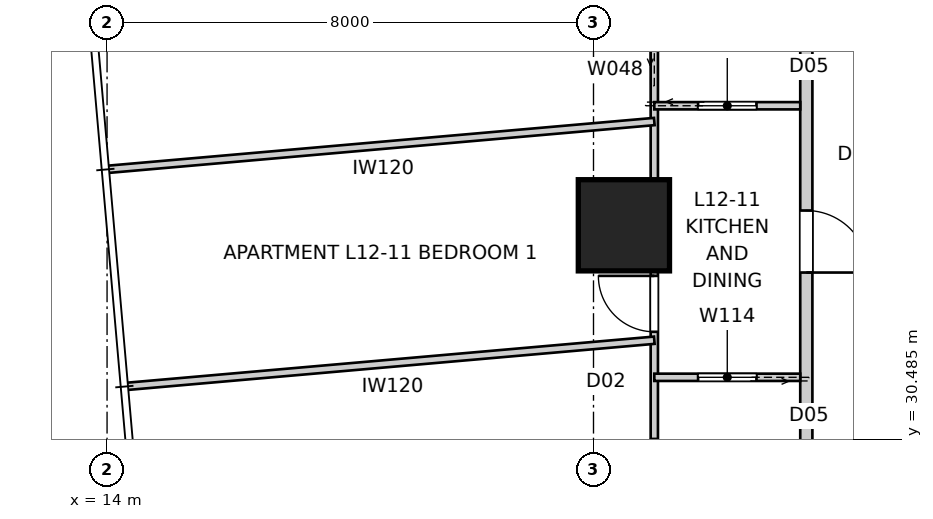
"""IFC4 building model, lengths in metres.
Left out: names, types, materials, properties, quantities, classifications, styles, units other than length and angle.
Written with IfcOpenShell. Run it as: python <this file> out.ifc"""

import sys

from ifc_helpers import new_model, si_unit, direction, frame, frame_2d, origin, origin_2d, place, context, subcontext, project, spatial, rectangle, extrude, element, fill, save


model = new_model("IFC4")
c1 = context("Model", 3, precision=1e-05, world=origin(), true_north=direction((0.0, 1.0)))
c2 = subcontext(c1, "Body", "Model", "MODEL_VIEW")
j1 = project(units=[si_unit("LENGTHUNIT", "METRE"), si_unit("PLANEANGLEUNIT", "RADIAN")], contexts=[c1])
p1 = place(None, origin())
s1 = spatial("IfcSite", under=j1, at=p1, CompositionType="ELEMENT")
p2 = place(p1, origin())
s2 = spatial("IfcBuilding", under=s1, at=p2, CompositionType="ELEMENT")
p3 = place(p2, frame((0.0, 0.0, 47.2)))
s3 = spatial("IfcBuildingStorey", under=s2, at=p3, CompositionType="ELEMENT", Elevation=47.2)
p4 = place(p3, frame((22.5, 34.0, 0.0), z_axis=(0.0, 0.0, 1.0), x_axis=(1.0, 0.0, 0.0)))
e1 = element("IfcColumn", 1, at=p4, inside=s3, PredefinedType="COLUMN", context=c2, shape_type="SweptSolid", body=[
    extrude(rectangle(XDim=1.5, YDim=1.5, at=origin_2d()), origin(), (0.0, 0.0, 1.0), 3.4),
])
p5 = place(p3, frame((25.5, 43.7, 0.0), z_axis=(0.0, 0.0, 1.0), x_axis=(0.0, -1.0, 0.0)))
e2 = element("IfcWall", 2, at=p5, inside=s3, PredefinedType="PARTITIONING", context=c2, shape_type="SweptSolid", body=[
    extrude(rectangle(XDim=28.2, YDim=0.2, at=frame_2d((14.1, 0.0))), origin(), (0.0, 0.0, 1.0), 3.25),
])
p6 = place(p5, frame((21.113, 0.0, 0.0)))
e3 = element("IfcOpeningElement", 3, at=p6, cuts=e2, PredefinedType="OPENING", context=c2, shape_type="SweptSolid", body=[
    extrude(rectangle(XDim=1.02, YDim=2.34, at=frame_2d((0.51, 1.17))), frame((0.0, 0.11, 0.0), z_axis=(0.0, -1.0, 0.0), x_axis=(1.0, 0.0, 0.0)), (0.0, 0.0, 1.0), 0.22),
])
p7 = place(p5, frame((9.457, 0.0, 0.0)))
e4 = element("IfcOpeningElement", 4, at=p7, cuts=e2, PredefinedType="OPENING", context=c2, shape_type="SweptSolid", body=[
    extrude(rectangle(XDim=1.02, YDim=2.34, at=frame_2d((0.51, 1.17))), frame((0.0, 0.11, 0.0), z_axis=(0.0, -1.0, 0.0), x_axis=(1.0, 0.0, 0.0)), (0.0, 0.0, 1.0), 0.22),
])
p8 = place(p3, frame((23.0, 21.319, 0.0), z_axis=(0.0, 0.0, 1.0), x_axis=(0.0, 1.0, 0.0)))
e5 = element("IfcWall", 5, at=p8, inside=s3, PredefinedType="PARTITIONING", context=c2, shape_type="SweptSolid", body=[
    extrude(rectangle(XDim=25.681, YDim=0.12, at=frame_2d((12.841, 0.0))), origin(), (0.0, 0.0, 1.0), 2.55),
])
p9 = place(p8, frame((1.364, 0.0, 0.0)))
e6 = element("IfcOpeningElement", 6, at=p9, cuts=e5, PredefinedType="OPENING", context=c2, shape_type="SweptSolid", body=[
    extrude(rectangle(XDim=0.92, YDim=2.34, at=frame_2d((0.46, 1.17))), frame((0.0, 0.07, 0.0), z_axis=(0.0, -1.0, 0.0), x_axis=(1.0, 0.0, 0.0)), (0.0, 0.0, 1.0), 0.14),
])
p10 = place(p8, frame((10.93, 0.0, 0.0)))
e7 = element("IfcOpeningElement", 7, at=p10, cuts=e5, PredefinedType="OPENING", context=c2, shape_type="SweptSolid", body=[
    extrude(rectangle(XDim=0.92, YDim=2.34, at=frame_2d((0.46, 1.17))), frame((0.0, 0.07, 0.0), z_axis=(0.0, -1.0, 0.0), x_axis=(1.0, 0.0, 0.0)), (0.0, 0.0, 1.0), 0.14),
])
p11 = place(p8, frame((22.233, 0.0, 0.0)))
e8 = element("IfcOpeningElement", 8, at=p11, cuts=e5, PredefinedType="OPENING", context=c2, shape_type="SweptSolid", body=[
    extrude(rectangle(XDim=0.92, YDim=2.34, at=frame_2d((0.46, 1.17))), frame((0.0, 0.07, 0.0), z_axis=(0.0, -1.0, 0.0), x_axis=(1.0, 0.0, 0.0)), (0.0, 0.0, 1.0), 0.14),
])
p12 = place(p8, frame((18.991, 0.0, 0.0)))
e9 = element("IfcOpeningElement", 9, at=p12, cuts=e5, PredefinedType="OPENING", context=c2, shape_type="SweptSolid", body=[
    extrude(rectangle(XDim=0.96, YDim=2.1, at=frame_2d((0.48, 1.05))), frame((0.0, 0.07, 0.0), z_axis=(0.0, -1.0, 0.0), x_axis=(1.0, 0.0, 0.0)), (0.0, 0.0, 1.0), 0.14),
])
p13 = place(p8, frame((5.561, 0.0, 0.0)))
e10 = element("IfcOpeningElement", 10, at=p13, cuts=e5, PredefinedType="OPENING", context=c2, shape_type="SweptSolid", body=[
    extrude(rectangle(XDim=0.96, YDim=2.1, at=frame_2d((0.48, 1.05))), frame((0.0, 0.07, 0.0), z_axis=(0.0, -1.0, 0.0), x_axis=(1.0, 0.0, 0.0)), (0.0, 0.0, 1.0), 0.14),
])
p14 = place(p8, frame((15.836, 0.0, 0.0)))
e11 = element("IfcOpeningElement", 11, at=p14, cuts=e5, PredefinedType="OPENING", context=c2, shape_type="SweptSolid", body=[
    extrude(rectangle(XDim=0.96, YDim=2.1, at=frame_2d((0.48, 1.05))), frame((0.0, 0.07, 0.0), z_axis=(0.0, -1.0, 0.0), x_axis=(1.0, 0.0, 0.0)), (0.0, 0.0, 1.0), 0.14),
])
p15 = place(p8, frame((8.208, 0.0, 0.0)))
e12 = element("IfcOpeningElement", 12, at=p15, cuts=e5, PredefinedType="OPENING", context=c2, shape_type="SweptSolid", body=[
    extrude(rectangle(XDim=0.96, YDim=2.1, at=frame_2d((0.48, 1.05))), frame((0.0, 0.07, 0.0), z_axis=(0.0, -1.0, 0.0), x_axis=(1.0, 0.0, 0.0)), (0.0, 0.0, 1.0), 0.14),
])
p16 = place(p3, frame((23.0, 35.966, 0.0), z_axis=(0.0, 0.0, 1.0), x_axis=(1.0, 0.0, 0.0)))
e13 = element("IfcWall", 13, at=p16, inside=s3, PredefinedType="PARTITIONING", context=c2, shape_type="SweptSolid", body=[
    extrude(rectangle(XDim=2.4, YDim=0.12, at=frame_2d((1.2, 0.0))), origin(), (0.0, 0.0, 1.0), 3.25),
])
p17 = place(p16, frame((0.72, 0.0, 0.0)))
e14 = element("IfcOpeningElement", 14, at=p17, cuts=e13, PredefinedType="OPENING", context=c2, shape_type="SweptSolid", body=[
    extrude(rectangle(XDim=0.96, YDim=2.1, at=frame_2d((0.48, 1.05))), frame((0.0, 0.07, 0.0), z_axis=(0.0, -1.0, 0.0), x_axis=(1.0, 0.0, 0.0)), (0.0, 0.0, 1.0), 0.14),
])
p18 = place(p3, frame((25.4, 31.5, 0.0), z_axis=(0.0, 0.0, 1.0), x_axis=(-1.0, 0.0, 0.0)))
e15 = element("IfcWall", 15, at=p18, inside=s3, PredefinedType="PARTITIONING", context=c2, shape_type="SweptSolid", body=[
    extrude(rectangle(XDim=2.4, YDim=0.12, at=frame_2d((1.2, 0.0))), origin(), (0.0, 0.0, 1.0), 3.25),
])
p19 = place(p18, frame((0.72, 0.0, 0.0)))
e16 = element("IfcOpeningElement", 16, at=p19, cuts=e15, PredefinedType="OPENING", context=c2, shape_type="SweptSolid", body=[
    extrude(rectangle(XDim=0.96, YDim=2.1, at=frame_2d((0.48, 1.05))), frame((0.0, 0.07, 0.0), z_axis=(0.0, -1.0, 0.0), x_axis=(1.0, 0.0, 0.0)), (0.0, 0.0, 1.0), 0.14),
])
p20 = place(p3, frame((23.0, 35.707, 0.0), z_axis=(0.0, 0.0, 1.0), x_axis=(-0.996194246178, -0.087160907995, 0.0)))
e17 = element("IfcWall", 17, at=p20, inside=s3, PredefinedType="PARTITIONING", context=c2, shape_type="SweptSolid", body=[
    extrude(rectangle(XDim=9.022, YDim=0.12, at=frame_2d((4.511, 0.0))), origin(), (0.0, 0.0, 1.0), 3.25),
])
p21 = place(p3, frame((23.0, 32.11, 0.0), z_axis=(0.0, 0.0, 1.0), x_axis=(-0.996194478193, -0.087158256162, 0.0)))
e18 = element("IfcWall", 18, at=p21, inside=s3, PredefinedType="PARTITIONING", context=c2, shape_type="SweptSolid", body=[
    extrude(rectangle(XDim=8.709, YDim=0.12, at=frame_2d((4.354, 0.0))), origin(), (0.0, 0.0, 1.0), 3.25),
])
p22 = place(p7, origin())
e19 = element("IfcDoor", 19, at=p22, inside=s3, OperationType="SINGLE_SWING_RIGHT", PredefinedType="DOOR", context=c2, shape_type="SweptSolid", body=[
    extrude(rectangle(XDim=1.02, YDim=2.34, at=frame_2d((0.51, 1.17))), frame((0.0, 0.025, 0.0), z_axis=(0.0, -1.0, 0.0), x_axis=(1.0, 0.0, 0.0)), (0.0, 0.0, 1.0), 0.05),
])
fill(e4, e19)
p23 = place(p10, origin())
e20 = element("IfcDoor", 20, at=p23, inside=s3, OperationType="SINGLE_SWING_RIGHT", PredefinedType="DOOR", context=c2, shape_type="SweptSolid", body=[
    extrude(rectangle(XDim=0.92, YDim=2.34, at=frame_2d((0.46, 1.17))), frame((0.0, 0.025, 0.0), z_axis=(0.0, -1.0, 0.0), x_axis=(1.0, 0.0, 0.0)), (0.0, 0.0, 1.0), 0.05),
])
fill(e7, e20)
p24 = place(p17, origin())
e21 = element("IfcDoor", 21, at=p24, inside=s3, OperationType="SLIDING_TO_LEFT", PredefinedType="DOOR", context=c2, shape_type="SweptSolid", body=[
    extrude(rectangle(XDim=0.96, YDim=2.1, at=frame_2d((0.48, 1.05))), frame((0.0, 0.025, 0.0), z_axis=(0.0, -1.0, 0.0), x_axis=(1.0, 0.0, 0.0)), (0.0, 0.0, 1.0), 0.05),
])
fill(e14, e21)
p25 = place(p19, origin())
e22 = element("IfcDoor", 22, at=p25, inside=s3, OperationType="SLIDING_TO_LEFT", PredefinedType="DOOR", context=c2, shape_type="SweptSolid", body=[
    extrude(rectangle(XDim=0.96, YDim=2.1, at=frame_2d((0.48, 1.05))), frame((0.0, 0.025, 0.0), z_axis=(0.0, -1.0, 0.0), x_axis=(1.0, 0.0, 0.0)), (0.0, 0.0, 1.0), 0.05),
])
fill(e16, e22)
p26 = place(p15, origin())
e23 = element("IfcDoor", 23, at=p26, inside=s3, OperationType="SLIDING_TO_LEFT", PredefinedType="DOOR", context=c2, shape_type="SweptSolid", body=[
    extrude(rectangle(XDim=0.96, YDim=2.1, at=frame_2d((0.48, 1.05))), frame((0.0, 0.025, 0.0), z_axis=(0.0, -1.0, 0.0), x_axis=(1.0, 0.0, 0.0)), (0.0, 0.0, 1.0), 0.05),
])
fill(e12, e23)
save(model, sys.argv[1])
